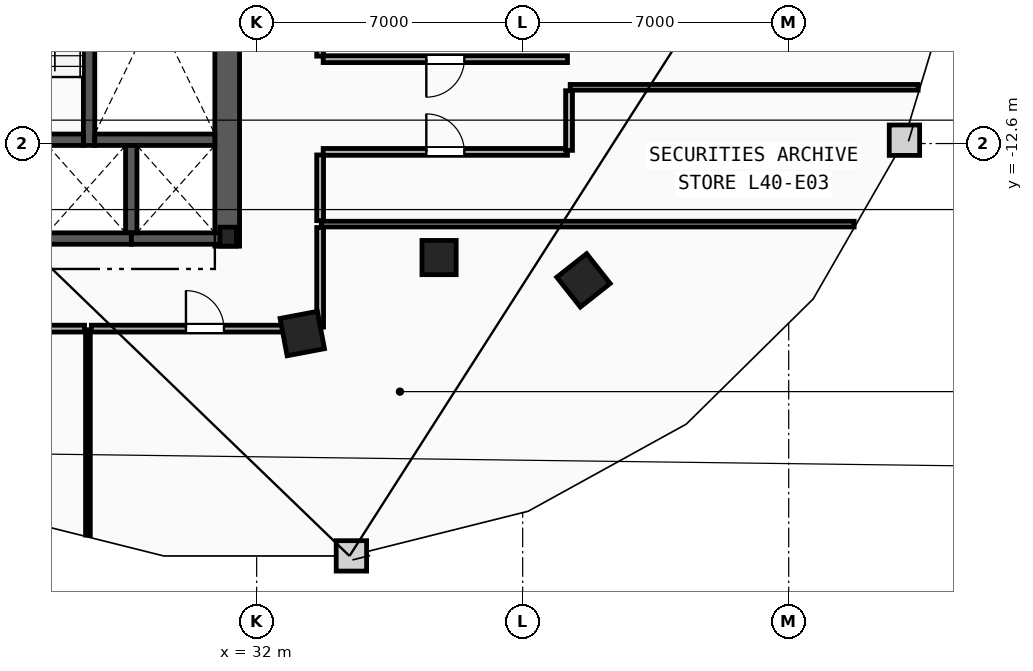
"""IFC4 building model, lengths in metres.
Left out: names, types, materials, properties, quantities, classifications, styles, units other than length and angle.
Written with IfcOpenShell. Run it as: python <this file> out.ifc"""

import sys

from ifc_helpers import new_model, si_unit, direction, frame, frame_2d, origin, origin_2d, place, context, subcontext, project, spatial, rectangle, i_section, extrude, element, fill, save


model = new_model("IFC4")
c1 = context("Model", 3, precision=1e-05, world=origin(), true_north=direction((0.0, 1.0)))
c2 = subcontext(c1, "Body", "Model", "MODEL_VIEW")
j1 = project(units=[si_unit("LENGTHUNIT", "METRE"), si_unit("PLANEANGLEUNIT", "RADIAN")], contexts=[c1])
p1 = place(None, origin())
s1 = spatial("IfcSite", under=j1, at=p1, CompositionType="ELEMENT")
p2 = place(p1, origin())
s2 = spatial("IfcBuilding", under=s1, at=p2, CompositionType="ELEMENT")
p3 = place(p2, frame((0.0, 0.0, 154.8)))
s3 = spatial("IfcBuildingStorey", under=s2, at=p3, CompositionType="ELEMENT", Elevation=154.8)
p4 = place(p3, frame((31.25, -15.05, 0.0), z_axis=(0.0, 0.0, 1.0), x_axis=(1.0, 0.0, 0.0)))
e1 = element("IfcColumn", 1, at=p4, inside=s3, PredefinedType="COLUMN", context=c2, shape_type="SweptSolid", body=[
    extrude(i_section(OverallWidth=0.432, OverallDepth=0.498, WebThickness=0.056, FlangeThickness=0.089, FilletRadius=0.018, at=origin_2d()), origin(), (0.0, 0.0, 1.0), 3.6),
])
p5 = place(p3, frame((36.8, -15.6, 0.0), z_axis=(0.0, 0.0, 1.0), x_axis=(1.0, 0.0, 0.0)))
e2 = element("IfcColumn", 2, at=p5, inside=s3, PredefinedType="COLUMN", context=c2, shape_type="SweptSolid", body=[
    extrude(rectangle(XDim=0.9, YDim=0.9, at=origin_2d()), origin(), (0.0, 0.0, 1.0), 3.6),
])
for number, where, z_axis, x_axis in (
    (3, (33.2, -17.6, 0.0), (0.0, 0.0, 1.0), (0.983, 0.186, 0.0)),
    (4, (40.6, -16.2, 0.0), (0.0, 0.0, 1.0), (0.785, 0.619, 0.0)),
):
    element("IfcColumn", number, at=place(p3, frame(where, z_axis=z_axis, x_axis=x_axis)), inside=s3, PredefinedType="COLUMN", context=c2, shape_type="SweptSolid", body=[
        extrude(rectangle(XDim=1.0, YDim=1.0, at=origin_2d()), origin(), (0.0, 0.0, 1.0), 3.6),
    ])
p6 = place(p3, frame((31.225, -15.3, 0.0), z_axis=(0.0, 0.0, 1.0), x_axis=(0.0, 1.0, 0.0)))
e5 = element("IfcWall", 5, at=p6, inside=s3, PredefinedType="SHEAR", context=c2, shape_type="SweptSolid", body=[
    extrude(rectangle(XDim=13.33, YDim=0.65, at=frame_2d((6.665, 0.0))), origin(), (0.0, 0.0, 1.0), 3.36),
])
p7 = place(p3, frame((27.59, -12.65, 0.0), z_axis=(0.0, 0.0, 1.0), x_axis=(0.0, 1.0, 0.0)))
e6 = element("IfcWall", 6, at=p7, inside=s3, PredefinedType="SHEAR", context=c2, shape_type="SweptSolid", body=[
    extrude(rectangle(XDim=10.68, YDim=0.3, at=frame_2d((5.34, 0.0))), origin(), (0.0, 0.0, 1.0), 3.36),
])
p8 = place(p3, frame((27.74, -12.5, 0.0), z_axis=(0.0, 0.0, 1.0), x_axis=(1.0, 0.0, 0.0)))
e7 = element("IfcWall", 7, at=p8, inside=s3, PredefinedType="SHEAR", context=c2, shape_type="SweptSolid", body=[
    extrude(rectangle(XDim=3.16, YDim=0.3, at=frame_2d((1.58, 0.0))), origin(), (0.0, 0.0, 1.0), 3.36),
])
p9 = place(p3, frame((24.28, -12.5, 0.0), z_axis=(0.0, 0.0, 1.0), x_axis=(1.0, 0.0, 0.0)))
e8 = element("IfcWall", 8, at=p9, inside=s3, PredefinedType="SHEAR", context=c2, shape_type="SweptSolid", body=[
    extrude(rectangle(XDim=3.16, YDim=0.3, at=frame_2d((1.58, 0.0))), origin(), (0.0, 0.0, 1.0), 3.36),
])
p10 = place(p9, frame((1.03, 0.0, 0.0)))
e9 = element("IfcOpeningElement", 9, at=p10, cuts=e8, PredefinedType="OPENING", context=c2, shape_type="SweptSolid", body=[
    extrude(rectangle(XDim=1.1, YDim=2.15, at=frame_2d((0.55, 1.075))), frame((0.0, 0.16, 0.0), z_axis=(0.0, -1.0, 0.0), x_axis=(1.0, 0.0, 0.0)), (0.0, 0.0, 1.0), 0.32),
])
p11 = place(p3, frame((28.7, -15.1, 0.0), z_axis=(0.0, 0.0, 1.0), x_axis=(1.0, 0.0, 0.0)))
e10 = element("IfcWall", 10, at=p11, inside=s3, PredefinedType="SHEAR", context=c2, shape_type="SweptSolid", body=[
    extrude(rectangle(XDim=2.5, YDim=0.3, at=frame_2d((1.25, 0.0))), origin(), (0.0, 0.0, 1.0), 3.36),
])
p12 = place(p3, frame((28.7, -14.95, 0.0), z_axis=(0.0, 0.0, 1.0), x_axis=(0.0, 1.0, 0.0)))
e11 = element("IfcWall", 11, at=p12, inside=s3, PredefinedType="SHEAR", context=c2, shape_type="SweptSolid", body=[
    extrude(rectangle(XDim=2.3, YDim=0.3, at=frame_2d((1.15, 0.0))), origin(), (0.0, 0.0, 1.0), 3.36),
])
p13 = place(p3, frame((26.2, -15.1, 0.0), z_axis=(0.0, 0.0, 1.0), x_axis=(1.0, 0.0, 0.0)))
e12 = element("IfcWall", 12, at=p13, inside=s3, PredefinedType="SHEAR", context=c2, shape_type="SweptSolid", body=[
    extrude(rectangle(XDim=2.5, YDim=0.3, at=frame_2d((1.25, 0.0))), origin(), (0.0, 0.0, 1.0), 3.36),
])
p14 = place(p3, frame((40.25, -11.12, 0.0), z_axis=(0.0, 0.0, 1.0), x_axis=(1.0, 0.0, 0.0)))
e13 = element("IfcWall", 13, at=p14, inside=s3, PredefinedType="PARTITIONING", context=c2, shape_type="SweptSolid", body=[
    extrude(rectangle(XDim=9.156, YDim=0.15, at=frame_2d((4.578, 0.0))), origin(), (0.0, 0.0, 1.0), 3.36),
])
p15 = place(p3, frame((33.7, -14.72, 0.0), z_axis=(0.0, 0.0, 1.0), x_axis=(1.0, 0.0, 0.0)))
e14 = element("IfcWall", 14, at=p15, inside=s3, PredefinedType="PARTITIONING", context=c2, shape_type="SweptSolid", body=[
    extrude(rectangle(XDim=14.023, YDim=0.15, at=frame_2d((7.011, 0.0))), origin(), (0.0, 0.0, 1.0), 3.36),
])
p16 = place(p3, frame((27.56, -22.901, 0.0), z_axis=(0.0, 0.0, 1.0), x_axis=(0.0, 1.0, 0.0)))
e15 = element("IfcWall", 15, at=p16, inside=s3, PredefinedType="PARTITIONING", context=c2, shape_type="SweptSolid", body=[
    extrude(rectangle(XDim=5.401, YDim=0.125, at=frame_2d((2.701, 0.0))), origin(), (0.0, 0.0, 1.0), 3.36),
])
p17 = place(p3, frame((18.342, -17.47, 0.0), z_axis=(0.0, 0.0, 1.0), x_axis=(1.0, 0.0, 0.0)))
e16 = element("IfcWall", 16, at=p17, inside=s3, PredefinedType="PARTITIONING", context=c2, shape_type="SweptSolid", body=[
    extrude(rectangle(XDim=9.128, YDim=0.18, at=frame_2d((4.564, 0.0))), origin(), (0.0, 0.0, 1.0), 3.36),
])
p18 = place(p17, frame((4.064, 0.0, 0.0)))
e17 = element("IfcOpeningElement", 17, at=p18, cuts=e16, PredefinedType="OPENING", context=c2, shape_type="SweptSolid", body=[
    extrude(rectangle(XDim=1.0, YDim=2.15, at=frame_2d((0.5, 1.075))), frame((0.0, 0.1, 0.0), z_axis=(0.0, -1.0, 0.0), x_axis=(1.0, 0.0, 0.0)), (0.0, 0.0, 1.0), 0.2),
])
p19 = place(p3, frame((27.65, -17.47, 0.0), z_axis=(0.0, 0.0, 1.0), x_axis=(1.0, 0.0, 0.0)))
e18 = element("IfcWall", 18, at=p19, inside=s3, PredefinedType="PARTITIONING", context=c2, shape_type="SweptSolid", body=[
    extrude(rectangle(XDim=5.979, YDim=0.18, at=frame_2d((2.989, 0.0))), origin(), (0.0, 0.0, 1.0), 3.36),
])
p20 = place(p19, frame((2.489, 0.0, 0.0)))
e19 = element("IfcOpeningElement", 19, at=p20, cuts=e18, PredefinedType="OPENING", context=c2, shape_type="SweptSolid", body=[
    extrude(rectangle(XDim=1.0, YDim=2.15, at=frame_2d((0.5, 1.075))), frame((0.0, 0.1, 0.0), z_axis=(0.0, -1.0, 0.0), x_axis=(1.0, 0.0, 0.0)), (0.0, 0.0, 1.0), 0.2),
])
p21 = place(p3, frame((33.67, -17.428, 0.0), z_axis=(0.0, 0.0, 1.0), x_axis=(0.0, 1.0, 0.0)))
e20 = element("IfcWall", 20, at=p21, inside=s3, PredefinedType="PARTITIONING", context=c2, shape_type="SweptSolid", body=[
    extrude(rectangle(XDim=2.618, YDim=0.18, at=frame_2d((1.309, 0.0))), origin(), (0.0, 0.0, 1.0), 3.36),
])
p22 = place(p3, frame((33.75, -12.82, 0.0), z_axis=(0.0, 0.0, 1.0), x_axis=(1.0, 0.0, 0.0)))
e21 = element("IfcWall", 21, at=p22, inside=s3, PredefinedType="PARTITIONING", context=c2, shape_type="SweptSolid", body=[
    extrude(rectangle(XDim=6.428, YDim=0.18, at=frame_2d((3.214, 0.0))), origin(), (0.0, 0.0, 1.0), 3.36),
])
p23 = place(p22, frame((2.714, 0.0, 0.0)))
e22 = element("IfcOpeningElement", 22, at=p23, cuts=e21, PredefinedType="OPENING", context=c2, shape_type="SweptSolid", body=[
    extrude(rectangle(XDim=1.0, YDim=2.15, at=frame_2d((0.5, 1.075))), frame((0.0, 0.1, 0.0), z_axis=(0.0, -1.0, 0.0), x_axis=(1.0, 0.0, 0.0)), (0.0, 0.0, 1.0), 0.2),
])
p24 = place(p3, frame((33.67, -14.63, 0.0), z_axis=(0.0, 0.0, 1.0), x_axis=(0.0, 1.0, 0.0)))
e23 = element("IfcWall", 23, at=p24, inside=s3, PredefinedType="PARTITIONING", context=c2, shape_type="SweptSolid", body=[
    extrude(rectangle(XDim=1.73, YDim=0.18, at=frame_2d((0.865, 0.0))), origin(), (0.0, 0.0, 1.0), 3.36),
])
p25 = place(p3, frame((40.22, -12.779, 0.0), z_axis=(0.0, 0.0, 1.0), x_axis=(0.0, 1.0, 0.0)))
e24 = element("IfcWall", 24, at=p25, inside=s3, PredefinedType="PARTITIONING", context=c2, shape_type="SweptSolid", body=[
    extrude(rectangle(XDim=1.569, YDim=0.18, at=frame_2d((0.784, 0.0))), origin(), (0.0, 0.0, 1.0), 3.36),
])
p26 = place(p3, frame((40.178, -10.38, 0.0), z_axis=(0.0, 0.0, 1.0), x_axis=(-1.0, 0.0, 0.0)))
e25 = element("IfcWall", 25, at=p26, inside=s3, PredefinedType="PARTITIONING", context=c2, shape_type="SweptSolid", body=[
    extrude(rectangle(XDim=6.428, YDim=0.18, at=frame_2d((3.214, 0.0))), origin(), (0.0, 0.0, 1.0), 3.36),
])
p27 = place(p26, frame((2.714, 0.0, 0.0)))
e26 = element("IfcOpeningElement", 26, at=p27, cuts=e25, PredefinedType="OPENING", context=c2, shape_type="SweptSolid", body=[
    extrude(rectangle(XDim=1.0, YDim=2.15, at=frame_2d((0.5, 1.075))), frame((0.0, 0.1, 0.0), z_axis=(0.0, -1.0, 0.0), x_axis=(1.0, 0.0, 0.0)), (0.0, 0.0, 1.0), 0.2),
])
p28 = place(p3, frame((33.67, -10.3, 0.0), z_axis=(0.0, 0.0, 1.0), x_axis=(0.0, 1.0, 0.0)))
e27 = element("IfcWall", 27, at=p28, inside=s3, PredefinedType="PARTITIONING", context=c2, shape_type="SweptSolid", body=[
    extrude(rectangle(XDim=0.949, YDim=0.18, at=frame_2d((0.474, 0.0))), origin(), (0.0, 0.0, 1.0), 3.36),
])
p29 = place(p23, origin())
e28 = element("IfcDoor", 28, at=p29, inside=s3, OperationType="SINGLE_SWING_LEFT", PredefinedType="DOOR", context=c2, shape_type="SweptSolid", body=[
    extrude(rectangle(XDim=1.0, YDim=2.15, at=frame_2d((0.5, 1.075))), frame((0.0, 0.025, 0.0), z_axis=(0.0, -1.0, 0.0), x_axis=(1.0, 0.0, 0.0)), (0.0, 0.0, 1.0), 0.05),
])
fill(e22, e28)
p30 = place(p27, origin())
e29 = element("IfcDoor", 29, at=p30, inside=s3, OperationType="SINGLE_SWING_RIGHT", PredefinedType="DOOR", context=c2, shape_type="SweptSolid", body=[
    extrude(rectangle(XDim=1.0, YDim=2.15, at=frame_2d((0.5, 1.075))), frame((0.0, 0.025, 0.0), z_axis=(0.0, -1.0, 0.0), x_axis=(1.0, 0.0, 0.0)), (0.0, 0.0, 1.0), 0.05),
])
fill(e26, e29)
p31 = place(p20, origin())
e30 = element("IfcDoor", 30, at=p31, inside=s3, OperationType="SINGLE_SWING_LEFT", PredefinedType="DOOR", context=c2, shape_type="SweptSolid", body=[
    extrude(rectangle(XDim=1.0, YDim=2.15, at=frame_2d((0.5, 1.075))), frame((0.0, 0.025, 0.0), z_axis=(0.0, -1.0, 0.0), x_axis=(1.0, 0.0, 0.0)), (0.0, 0.0, 1.0), 0.05),
])
fill(e19, e30)
save(model, sys.argv[1])
